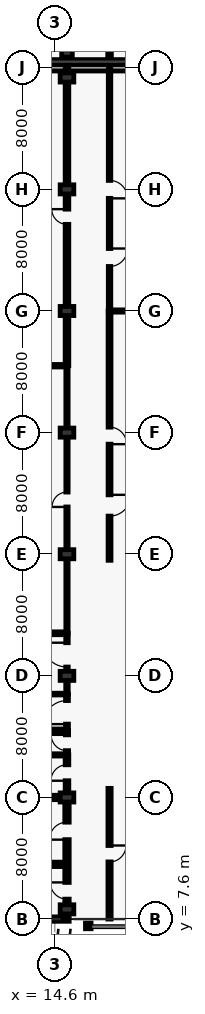
"""IFC4 building model, lengths in metres.
Left out: names, types, materials, properties, quantities, classifications, styles, units other than length and angle.
Written with IfcOpenShell. Run it as: python <this file> out.ifc"""

import sys

from ifc_helpers import new_model, si_unit, direction, frame, frame_2d, origin, origin_2d, place, context, subcontext, project, spatial, rectangle, i_section, extrude, element, fill, save


model = new_model("IFC4")
c1 = context("Model", 3, precision=1e-05, world=origin(), true_north=direction((0.0, 1.0)))
c2 = subcontext(c1, "Body", "Model", "MODEL_VIEW")
j1 = project(units=[si_unit("LENGTHUNIT", "METRE"), si_unit("PLANEANGLEUNIT", "RADIAN")], contexts=[c1])
p1 = place(None, origin())
s1 = spatial("IfcSite", under=j1, at=p1, CompositionType="ELEMENT")
p2 = place(p1, origin())
s2 = spatial("IfcBuilding", under=s1, at=p2, CompositionType="ELEMENT")
p3 = place(p2, frame((0.0, 0.0, 10.2)))
s3 = spatial("IfcBuildingStorey", under=s2, at=p3, CompositionType="ELEMENT", Elevation=10.2)
for number, where, z_axis, x_axis in (
    (1, (15.4, 8.24, 0.0), (0.0, 0.0, 1.0), (1.0, 0.0, 0.0)),
    (2, (15.4, 15.6, 0.0), (0.0, 0.0, 1.0), (1.0, 0.0, 0.0)),
    (3, (15.4, 23.6, 0.0), (0.0, 0.0, 1.0), (1.0, 0.0, 0.0)),
    (4, (15.4, 31.6, 0.0), (0.0, 0.0, 1.0), (1.0, 0.0, 0.0)),
    (5, (15.4, 39.6, 0.0), (0.0, 0.0, 1.0), (1.0, 0.0, 0.0)),
    (6, (15.4, 47.6, 0.0), (0.0, 0.0, 1.0), (1.0, 0.0, 0.0)),
    (7, (15.4, 55.6, 0.0), (0.0, 0.0, 1.0), (1.0, 0.0, 0.0)),
    (8, (15.4, 62.96, 0.0), (0.0, 0.0, 1.0), (1.0, 0.0, 0.0)),
):
    element("IfcColumn", number, at=place(p3, frame(where, z_axis=z_axis, x_axis=x_axis)), inside=s3, PredefinedType="COLUMN", context=c2, shape_type="SweptSolid", body=[
        extrude(rectangle(XDim=0.6, YDim=0.9, at=origin_2d()), origin(), (0.0, 0.0, 1.0), 5.4),
    ])
p4 = place(p3, frame((15.4, 64.64, 0.0), z_axis=(0.0, 0.0, 1.0), x_axis=(1.0, 0.0, 0.0)))
e9 = element("IfcColumn", 9, at=p4, inside=s3, PredefinedType="COLUMN", context=c2, shape_type="SweptSolid", body=[
    extrude(rectangle(XDim=0.7, YDim=0.7, at=origin_2d()), origin(), (0.0, 0.0, 1.0), 5.4),
])
p5 = place(p3, frame((16.8, 7.15, 0.0), z_axis=(0.0, 0.0, 1.0), x_axis=(1.0, 0.0, 0.0)))
e10 = element("IfcColumn", 10, at=p5, inside=s3, PredefinedType="COLUMN", context=c2, shape_type="SweptSolid", body=[
    extrude(i_section(OverallWidth=0.373, OverallDepth=0.368, WebThickness=0.014, FlangeThickness=0.024, at=origin_2d()), origin(), (0.0, 0.0, 1.0), 5.4),
])
p6 = place(p3, frame((8.0, 63.6, 0.0), z_axis=(0.0, 0.0, 1.0), x_axis=(1.0, 0.0, 0.0)))
e11 = element("IfcWall", 11, at=p6, inside=s3, PredefinedType="SOLIDWALL", context=c2, shape_type="SweptSolid", body=[
    extrude(rectangle(XDim=38.0, YDim=0.425, at=frame_2d((19.0, 0.0))), origin(), (0.0, 0.0, 1.0), 5.16),
])
p7 = place(p3, frame((40.2, 64.0, 0.0), z_axis=(0.0, 0.0, 1.0), x_axis=(-1.0, 0.0, 0.0)))
e12 = element("IfcWall", 12, at=p7, inside=s3, PredefinedType="SOLIDWALL", context=c2, shape_type="SweptSolid", body=[
    extrude(rectangle(XDim=32.2, YDim=0.275, at=frame_2d((16.1, 0.0))), origin(), (0.0, 0.0, 1.0), 3.7),
])
p8 = place(p3, frame((15.4, 64.145, 0.0), z_axis=(0.0, 0.0, 1.0), x_axis=(0.0, 1.0, 0.0)))
e13 = element("IfcWall", 13, at=p8, inside=s3, PredefinedType="SHEAR", context=c2, shape_type="SweptSolid", body=[
    extrude(rectangle(XDim=7.103, YDim=0.29, at=frame_2d((3.552, 0.0))), origin(), (0.0, 0.0, 1.0), 5.1),
])
p9 = place(p8, frame((1.105, 0.0, 0.0)))
e14 = element("IfcOpeningElement", 14, at=p9, cuts=e13, PredefinedType="OPENING", context=c2, shape_type="SweptSolid", body=[
    extrude(rectangle(XDim=1.1, YDim=2.15, at=frame_2d((0.55, 1.075))), frame((0.0, 0.155, 0.0), z_axis=(0.0, -1.0, 0.0), x_axis=(1.0, 0.0, 0.0)), (0.0, 0.0, 1.0), 0.31),
])
p10 = place(p8, frame((4.88, 0.0, 0.0)))
e15 = element("IfcOpeningElement", 15, at=p10, cuts=e13, PredefinedType="OPENING", context=c2, shape_type="SweptSolid", body=[
    extrude(rectangle(XDim=1.15, YDim=2.2, at=frame_2d((0.575, 1.1))), frame((0.0, 0.155, 0.0), z_axis=(0.0, -1.0, 0.0), x_axis=(1.0, 0.0, 0.0)), (0.0, 0.0, 1.0), 0.31),
])
p11 = place(p3, frame((7.855, 7.6, 0.0), z_axis=(0.0, 0.0, 1.0), x_axis=(1.0, 0.0, 0.0)))
e16 = element("IfcWall", 16, at=p11, inside=s3, PredefinedType="SHEAR", context=c2, shape_type="SweptSolid", body=[
    extrude(rectangle(XDim=7.69, YDim=0.29, at=frame_2d((3.845, 0.0))), origin(), (0.0, 0.0, 1.0), 5.16),
])
p12 = place(p3, frame((7.855, 15.6, 0.0), z_axis=(0.0, 0.0, 1.0), x_axis=(1.0, 0.0, 0.0)))
e17 = element("IfcWall", 17, at=p12, inside=s3, PredefinedType="SHEAR", context=c2, shape_type="SweptSolid", body=[
    extrude(rectangle(XDim=7.243, YDim=0.29, at=frame_2d((3.622, 0.0))), origin(), (0.0, 0.0, 1.0), 5.16),
])
p13 = place(p3, frame((15.4, 8.692, 0.0), z_axis=(0.0, 0.0, 1.0), x_axis=(0.0, 1.0, 0.0)))
e18 = element("IfcWall", 18, at=p13, inside=s3, PredefinedType="SHEAR", context=c2, shape_type="SweptSolid", body=[
    extrude(rectangle(XDim=6.456, YDim=0.29, at=frame_2d((3.228, 0.0))), origin(), (0.0, 0.0, 1.0), 5.16),
])
p14 = place(p13, frame((0.22, 0.0, 0.0)))
e19 = element("IfcOpeningElement", 19, at=p14, cuts=e18, PredefinedType="OPENING", context=c2, shape_type="SweptSolid", body=[
    extrude(rectangle(XDim=1.1, YDim=2.15, at=frame_2d((0.55, 1.075))), frame((0.0, 0.155, 0.0), z_axis=(0.0, -1.0, 0.0), x_axis=(1.0, 0.0, 0.0)), (0.0, 0.0, 1.0), 0.31),
])
p15 = place(p13, frame((4.133, 0.0, 0.0)))
e20 = element("IfcOpeningElement", 20, at=p15, cuts=e18, PredefinedType="OPENING", context=c2, shape_type="SweptSolid", body=[
    extrude(rectangle(XDim=1.15, YDim=2.2, at=frame_2d((0.575, 1.1))), frame((0.0, 0.155, 0.0), z_axis=(0.0, -1.0, 0.0), x_axis=(1.0, 0.0, 0.0)), (0.0, 0.0, 1.0), 0.31),
])
p16 = place(p3, frame((8.145, 11.2, 0.0), z_axis=(0.0, 0.0, 1.0), x_axis=(1.0, 0.0, 0.0)))
e21 = element("IfcWall", 21, at=p16, inside=s3, PredefinedType="SHEAR", context=c2, shape_type="SweptSolid", body=[
    extrude(rectangle(XDim=7.11, YDim=0.29, at=frame_2d((3.555, 0.0))), origin(), (0.0, 0.0, 1.0), 5.16),
])
p17 = place(p3, frame((15.4, 16.052, 0.0), z_axis=(0.0, 0.0, 1.0), x_axis=(0.0, 1.0, 0.0)))
e22 = element("IfcWall", 22, at=p17, inside=s3, PredefinedType="PARTITIONING", context=c2, shape_type="SweptSolid", body=[
    extrude(rectangle(XDim=2.348, YDim=0.24, at=frame_2d((1.174, 0.0))), origin(), (0.0, 0.0, 1.0), 4.31),
])
p18 = place(p17, frame((0.649, 0.0, 0.0)))
e23 = element("IfcOpeningElement", 23, at=p18, cuts=e22, PredefinedType="OPENING", context=c2, shape_type="SweptSolid", body=[
    extrude(rectangle(XDim=1.05, YDim=2.15, at=frame_2d((0.525, 1.075))), frame((0.0, 0.13, 0.0), z_axis=(0.0, -1.0, 0.0), x_axis=(1.0, 0.0, 0.0)), (0.0, 0.0, 1.0), 0.26),
])
p19 = place(p3, frame((15.4, 18.4, 0.0), z_axis=(0.0, 0.0, 1.0), x_axis=(0.0, 1.0, 0.0)))
e24 = element("IfcWall", 24, at=p19, inside=s3, PredefinedType="PARTITIONING", context=c2, shape_type="SweptSolid", body=[
    extrude(rectangle(XDim=1.6, YDim=0.21, at=frame_2d((0.8, 0.0))), origin(), (0.0, 0.0, 1.0), 4.31),
])
p20 = place(p19, frame((0.28, 0.0, 0.0)))
e25 = element("IfcOpeningElement", 25, at=p20, cuts=e24, PredefinedType="OPENING", context=c2, shape_type="SweptSolid", body=[
    extrude(rectangle(XDim=1.04, YDim=2.2, at=frame_2d((0.52, 1.1))), frame((0.0, 0.115, 0.0), z_axis=(0.0, -1.0, 0.0), x_axis=(1.0, 0.0, 0.0)), (0.0, 0.0, 1.0), 0.23),
])
p21 = place(p3, frame((15.4, 20.0, 0.0), z_axis=(0.0, 0.0, 1.0), x_axis=(0.0, 1.0, 0.0)))
e26 = element("IfcWall", 26, at=p21, inside=s3, PredefinedType="PARTITIONING", context=c2, shape_type="SweptSolid", body=[
    extrude(rectangle(XDim=2.4, YDim=0.19, at=frame_2d((1.2, 0.0))), origin(), (0.0, 0.0, 1.0), 4.31),
])
p22 = place(p21, frame((0.425, 0.0, 0.0)))
e27 = element("IfcOpeningElement", 27, at=p22, cuts=e26, PredefinedType="OPENING", context=c2, shape_type="SweptSolid", body=[
    extrude(rectangle(XDim=1.55, YDim=2.25, at=frame_2d((0.775, 1.125))), frame((0.0, 0.105, 0.0), z_axis=(0.0, -1.0, 0.0), x_axis=(1.0, 0.0, 0.0)), (0.0, 0.0, 1.0), 0.21),
])
p23 = place(p3, frame((15.4, 22.4, 0.0), z_axis=(0.0, 0.0, 1.0), x_axis=(0.0, 1.0, 0.0)))
e28 = element("IfcWall", 28, at=p23, inside=s3, PredefinedType="PARTITIONING", context=c2, shape_type="SweptSolid", body=[
    extrude(rectangle(XDim=4.0, YDim=0.165, at=frame_2d((2.0, 0.0))), origin(), (0.0, 0.0, 1.0), 4.31),
])
p24 = place(p23, frame((1.78, 0.0, 0.0)))
e29 = element("IfcOpeningElement", 29, at=p24, cuts=e28, PredefinedType="OPENING", context=c2, shape_type="SweptSolid", body=[
    extrude(rectangle(XDim=1.6, YDim=2.3, at=frame_2d((0.8, 1.15))), frame((0.0, 0.093, 0.0), z_axis=(0.0, -1.0, 0.0), x_axis=(1.0, 0.0, 0.0)), (0.0, 0.0, 1.0), 0.185),
])
p25 = place(p3, frame((15.4, 26.4, 0.0), z_axis=(0.0, 0.0, 1.0), x_axis=(0.0, 1.0, 0.0)))
e30 = element("IfcWall", 30, at=p25, inside=s3, PredefinedType="PARTITIONING", context=c2, shape_type="SweptSolid", body=[
    extrude(rectangle(XDim=17.6, YDim=0.15, at=frame_2d((8.8, 0.0))), origin(), (0.0, 0.0, 1.0), 4.31),
])
p26 = place(p25, frame((8.31, 0.0, 0.0)))
e31 = element("IfcOpeningElement", 31, at=p26, cuts=e30, PredefinedType="OPENING", context=c2, shape_type="SweptSolid", body=[
    extrude(rectangle(XDim=0.98, YDim=2.1, at=frame_2d((0.49, 1.05))), frame((0.0, 0.085, 0.0), z_axis=(0.0, -1.0, 0.0), x_axis=(1.0, 0.0, 0.0)), (0.0, 0.0, 1.0), 0.17),
])
p27 = place(p3, frame((15.4, 44.0, 0.0), z_axis=(0.0, 0.0, 1.0), x_axis=(0.0, 1.0, 0.0)))
e32 = element("IfcWall", 32, at=p27, inside=s3, PredefinedType="PARTITIONING", context=c2, shape_type="SweptSolid", body=[
    extrude(rectangle(XDim=19.6, YDim=0.24, at=frame_2d((9.8, 0.0))), origin(), (0.0, 0.0, 1.0), 4.31),
])
p28 = place(p27, frame((9.3, 0.0, 0.0)))
e33 = element("IfcOpeningElement", 33, at=p28, cuts=e32, PredefinedType="OPENING", context=c2, shape_type="SweptSolid", body=[
    extrude(rectangle(XDim=1.0, YDim=2.1, at=frame_2d((0.5, 1.05))), frame((0.0, 0.13, 0.0), z_axis=(0.0, -1.0, 0.0), x_axis=(1.0, 0.0, 0.0)), (0.0, 0.0, 1.0), 0.26),
])
p29 = place(p3, frame((18.2, 16.2, 0.0), z_axis=(0.0, 0.0, 1.0), x_axis=(0.0, -1.0, 0.0)))
e34 = element("IfcWall", 34, at=p29, inside=s3, PredefinedType="PARTITIONING", context=c2, shape_type="SweptSolid", body=[
    extrude(rectangle(XDim=8.6, YDim=0.21, at=frame_2d((4.3, 0.0))), origin(), (0.0, 0.0, 1.0), 5.16),
])
p30 = place(p29, frame((3.76, 0.0, 0.0)))
e35 = element("IfcOpeningElement", 35, at=p30, cuts=e34, PredefinedType="OPENING", context=c2, shape_type="SweptSolid", body=[
    extrude(rectangle(XDim=1.08, YDim=2.15, at=frame_2d((0.54, 1.075))), frame((0.0, 0.115, 0.0), z_axis=(0.0, -1.0, 0.0), x_axis=(1.0, 0.0, 0.0)), (0.0, 0.0, 1.0), 0.23),
])
p31 = place(p3, frame((18.2, 47.6, 0.0), z_axis=(0.0, 0.0, 1.0), x_axis=(0.0, -1.0, 0.0)))
e36 = element("IfcWall", 36, at=p31, inside=s3, PredefinedType="PARTITIONING", context=c2, shape_type="SweptSolid", body=[
    extrude(rectangle(XDim=16.4, YDim=0.19, at=frame_2d((8.2, 0.0))), origin(), (0.0, 0.0, 1.0), 5.16),
])
p32 = place(p31, frame((7.64, 0.0, 0.0)))
e37 = element("IfcOpeningElement", 37, at=p32, cuts=e36, PredefinedType="OPENING", context=c2, shape_type="SweptSolid", body=[
    extrude(rectangle(XDim=1.12, YDim=2.15, at=frame_2d((0.56, 1.075))), frame((0.0, 0.105, 0.0), z_axis=(0.0, -1.0, 0.0), x_axis=(1.0, 0.0, 0.0)), (0.0, 0.0, 1.0), 0.21),
])
p33 = place(p31, frame((12.092, 0.0, 0.0)))
e38 = element("IfcOpeningElement", 38, at=p33, cuts=e36, PredefinedType="OPENING", context=c2, shape_type="SweptSolid", body=[
    extrude(rectangle(XDim=1.4, YDim=2.25, at=frame_2d((0.7, 1.125))), frame((0.0, 0.105, 0.0), z_axis=(0.0, -1.0, 0.0), x_axis=(1.0, 0.0, 0.0)), (0.0, 0.0, 1.0), 0.21),
])
p34 = place(p3, frame((18.2, 63.6, 0.0), z_axis=(0.0, 0.0, 1.0), x_axis=(0.0, -1.0, 0.0)))
e39 = element("IfcWall", 39, at=p34, inside=s3, PredefinedType="PARTITIONING", context=c2, shape_type="SweptSolid", body=[
    extrude(rectangle(XDim=16.0, YDim=0.165, at=frame_2d((8.0, 0.0))), origin(), (0.0, 0.0, 1.0), 5.16),
])
p35 = place(p34, frame((7.41, 0.0, 0.0)))
e40 = element("IfcOpeningElement", 40, at=p35, cuts=e39, PredefinedType="OPENING", context=c2, shape_type="SweptSolid", body=[
    extrude(rectangle(XDim=1.18, YDim=2.15, at=frame_2d((0.59, 1.075))), frame((0.0, 0.093, 0.0), z_axis=(0.0, -1.0, 0.0), x_axis=(1.0, 0.0, 0.0)), (0.0, 0.0, 1.0), 0.185),
])
p36 = place(p34, frame((11.89, 0.0, 0.0)))
e41 = element("IfcOpeningElement", 41, at=p36, cuts=e39, PredefinedType="OPENING", context=c2, shape_type="SweptSolid", body=[
    extrude(rectangle(XDim=1.18, YDim=2.15, at=frame_2d((0.59, 1.075))), frame((0.0, 0.093, 0.0), z_axis=(0.0, -1.0, 0.0), x_axis=(1.0, 0.0, 0.0)), (0.0, 0.0, 1.0), 0.185),
])
p37 = place(p3, frame((12.0, 18.4, 0.0), z_axis=(0.0, 0.0, 1.0), x_axis=(1.0, 0.0, 0.0)))
e42 = element("IfcWall", 42, at=p37, inside=s3, PredefinedType="PARTITIONING", context=c2, shape_type="SweptSolid", body=[
    extrude(rectangle(XDim=3.4, YDim=0.15, at=frame_2d((1.7, 0.0))), origin(), (0.0, 0.0, 1.0), 5.16),
])
p38 = place(p3, frame((8.0, 20.0, 0.0), z_axis=(0.0, 0.0, 1.0), x_axis=(1.0, 0.0, 0.0)))
e43 = element("IfcWall", 43, at=p38, inside=s3, PredefinedType="PARTITIONING", context=c2, shape_type="SweptSolid", body=[
    extrude(rectangle(XDim=7.4, YDim=0.21, at=frame_2d((3.7, 0.0))), origin(), (0.0, 0.0, 1.0), 5.16),
])
p39 = place(p3, frame((8.0, 22.4, 0.0), z_axis=(0.0, 0.0, 1.0), x_axis=(1.0, 0.0, 0.0)))
e44 = element("IfcWall", 44, at=p39, inside=s3, PredefinedType="PARTITIONING", context=c2, shape_type="SweptSolid", body=[
    extrude(rectangle(XDim=7.4, YDim=0.115, at=frame_2d((3.7, 0.0))), origin(), (0.0, 0.0, 1.0), 5.16),
])
p40 = place(p3, frame((8.0, 26.4, 0.0), z_axis=(0.0, 0.0, 1.0), x_axis=(1.0, 0.0, 0.0)))
e45 = element("IfcWall", 45, at=p40, inside=s3, PredefinedType="PARTITIONING", context=c2, shape_type="SweptSolid", body=[
    extrude(rectangle(XDim=7.4, YDim=0.19, at=frame_2d((3.7, 0.0))), origin(), (0.0, 0.0, 1.0), 5.16),
])
p41 = place(p3, frame((8.0, 44.0, 0.0), z_axis=(0.0, 0.0, 1.0), x_axis=(1.0, 0.0, 0.0)))
e46 = element("IfcWall", 46, at=p41, inside=s3, PredefinedType="PARTITIONING", context=c2, shape_type="SweptSolid", body=[
    extrude(rectangle(XDim=7.4, YDim=0.165, at=frame_2d((3.7, 0.0))), origin(), (0.0, 0.0, 1.0), 5.16),
])
p42 = place(p3, frame((18.2, 47.6, 0.0), z_axis=(0.0, 0.0, 1.0), x_axis=(1.0, 0.0, 0.0)))
e47 = element("IfcWall", 47, at=p42, inside=s3, PredefinedType="PARTITIONING", context=c2, shape_type="SweptSolid", body=[
    extrude(rectangle(XDim=27.8, YDim=0.15, at=frame_2d((13.9, 0.0))), origin(), (0.0, 0.0, 1.0), 5.16),
])
p43 = place(p3, frame((18.2, 79.6, 0.0), z_axis=(0.0, 0.0, 1.0), x_axis=(0.0, -1.0, 0.0)))
e48 = element("IfcWall", 48, at=p43, inside=s3, PredefinedType="PARTITIONING", context=c2, shape_type="SweptSolid", body=[
    extrude(rectangle(XDim=15.6, YDim=0.24, at=frame_2d((7.8, 0.0))), origin(), (0.0, 0.0, 1.0), 5.1),
])
p44 = place(p43, frame((7.15, 0.0, 0.0)))
e49 = element("IfcOpeningElement", 49, at=p44, cuts=e48, PredefinedType="OPENING", context=c2, shape_type="SweptSolid", body=[
    extrude(rectangle(XDim=1.3, YDim=2.2, at=frame_2d((0.65, 1.1))), frame((0.0, 0.13, 0.0), z_axis=(0.0, -1.0, 0.0), x_axis=(1.0, 0.0, 0.0)), (0.0, 0.0, 1.0), 0.26),
])
p45 = place(p43, frame((11.468, 0.0, 0.0)))
e50 = element("IfcOpeningElement", 50, at=p45, cuts=e48, PredefinedType="OPENING", context=c2, shape_type="SweptSolid", body=[
    extrude(rectangle(XDim=1.4, YDim=2.25, at=frame_2d((0.7, 1.125))), frame((0.0, 0.13, 0.0), z_axis=(0.0, -1.0, 0.0), x_axis=(1.0, 0.0, 0.0)), (0.0, 0.0, 1.0), 0.26),
])
p46 = place(p14, origin())
e51 = element("IfcDoor", 51, at=p46, inside=s3, OperationType="SINGLE_SWING_RIGHT", PredefinedType="DOOR", context=c2, shape_type="SweptSolid", body=[
    extrude(rectangle(XDim=1.1, YDim=2.15, at=frame_2d((0.55, 1.075))), frame((0.0, 0.025, 0.0), z_axis=(0.0, -1.0, 0.0), x_axis=(1.0, 0.0, 0.0)), (0.0, 0.0, 1.0), 0.05),
])
fill(e19, e51)
p47 = place(p15, origin())
e52 = element("IfcDoor", 52, at=p47, inside=s3, OperationType="SINGLE_SWING_LEFT", PredefinedType="DOOR", context=c2, shape_type="SweptSolid", body=[
    extrude(rectangle(XDim=1.15, YDim=2.2, at=frame_2d((0.575, 1.1))), frame((0.0, 0.025, 0.0), z_axis=(0.0, -1.0, 0.0), x_axis=(1.0, 0.0, 0.0)), (0.0, 0.0, 1.0), 0.05),
])
fill(e20, e52)
p48 = place(p18, origin())
e53 = element("IfcDoor", 53, at=p48, inside=s3, OperationType="SINGLE_SWING_LEFT", PredefinedType="DOOR", context=c2, shape_type="SweptSolid", body=[
    extrude(rectangle(XDim=1.05, YDim=2.15, at=frame_2d((0.525, 1.075))), frame((0.0, 0.025, 0.0), z_axis=(0.0, -1.0, 0.0), x_axis=(1.0, 0.0, 0.0)), (0.0, 0.0, 1.0), 0.05),
])
fill(e23, e53)
p49 = place(p20, origin())
e54 = element("IfcDoor", 54, at=p49, inside=s3, OperationType="SINGLE_SWING_RIGHT", PredefinedType="DOOR", context=c2, shape_type="SweptSolid", body=[
    extrude(rectangle(XDim=1.04, YDim=2.2, at=frame_2d((0.52, 1.1))), frame((0.0, 0.025, 0.0), z_axis=(0.0, -1.0, 0.0), x_axis=(1.0, 0.0, 0.0)), (0.0, 0.0, 1.0), 0.05),
])
fill(e25, e54)
p50 = place(p22, origin())
e55 = element("IfcDoor", 55, at=p50, inside=s3, OperationType="SINGLE_SWING_LEFT", PredefinedType="DOOR", context=c2, shape_type="SweptSolid", body=[
    extrude(rectangle(XDim=1.55, YDim=2.25, at=frame_2d((0.775, 1.125))), frame((0.0, 0.025, 0.0), z_axis=(0.0, -1.0, 0.0), x_axis=(1.0, 0.0, 0.0)), (0.0, 0.0, 1.0), 0.05),
])
fill(e27, e55)
p51 = place(p24, origin())
e56 = element("IfcDoor", 56, at=p51, inside=s3, OperationType="SINGLE_SWING_RIGHT", PredefinedType="DOOR", context=c2, shape_type="SweptSolid", body=[
    extrude(rectangle(XDim=1.6, YDim=2.3, at=frame_2d((0.8, 1.15))), frame((0.0, 0.025, 0.0), z_axis=(0.0, -1.0, 0.0), x_axis=(1.0, 0.0, 0.0)), (0.0, 0.0, 1.0), 0.05),
])
fill(e29, e56)
p52 = place(p26, origin())
e57 = element("IfcDoor", 57, at=p52, inside=s3, OperationType="SINGLE_SWING_LEFT", PredefinedType="DOOR", context=c2, shape_type="SweptSolid", body=[
    extrude(rectangle(XDim=0.98, YDim=2.1, at=frame_2d((0.49, 1.05))), frame((0.0, 0.025, 0.0), z_axis=(0.0, -1.0, 0.0), x_axis=(1.0, 0.0, 0.0)), (0.0, 0.0, 1.0), 0.05),
])
fill(e31, e57)
p53 = place(p28, origin())
e58 = element("IfcDoor", 58, at=p53, inside=s3, OperationType="SINGLE_SWING_RIGHT", PredefinedType="DOOR", context=c2, shape_type="SweptSolid", body=[
    extrude(rectangle(XDim=1.0, YDim=2.1, at=frame_2d((0.5, 1.05))), frame((0.0, 0.025, 0.0), z_axis=(0.0, -1.0, 0.0), x_axis=(1.0, 0.0, 0.0)), (0.0, 0.0, 1.0), 0.05),
])
fill(e33, e58)
p54 = place(p30, origin())
e59 = element("IfcDoor", 59, at=p54, inside=s3, OperationType="SINGLE_SWING_LEFT", PredefinedType="DOOR", context=c2, shape_type="SweptSolid", body=[
    extrude(rectangle(XDim=1.08, YDim=2.15, at=frame_2d((0.54, 1.075))), frame((0.0, 0.025, 0.0), z_axis=(0.0, -1.0, 0.0), x_axis=(1.0, 0.0, 0.0)), (0.0, 0.0, 1.0), 0.05),
])
fill(e35, e59)
p55 = place(p32, origin())
e60 = element("IfcDoor", 60, at=p55, inside=s3, OperationType="SINGLE_SWING_RIGHT", PredefinedType="DOOR", context=c2, shape_type="SweptSolid", body=[
    extrude(rectangle(XDim=1.12, YDim=2.15, at=frame_2d((0.56, 1.075))), frame((0.0, 0.025, 0.0), z_axis=(0.0, -1.0, 0.0), x_axis=(1.0, 0.0, 0.0)), (0.0, 0.0, 1.0), 0.05),
])
fill(e37, e60)
p56 = place(p33, origin())
e61 = element("IfcDoor", 61, at=p56, inside=s3, OperationType="SINGLE_SWING_LEFT", PredefinedType="DOOR", context=c2, shape_type="SweptSolid", body=[
    extrude(rectangle(XDim=1.4, YDim=2.25, at=frame_2d((0.7, 1.125))), frame((0.0, 0.025, 0.0), z_axis=(0.0, -1.0, 0.0), x_axis=(1.0, 0.0, 0.0)), (0.0, 0.0, 1.0), 0.05),
])
fill(e38, e61)
p57 = place(p35, origin())
e62 = element("IfcDoor", 62, at=p57, inside=s3, OperationType="SINGLE_SWING_RIGHT", PredefinedType="DOOR", context=c2, shape_type="SweptSolid", body=[
    extrude(rectangle(XDim=1.18, YDim=2.15, at=frame_2d((0.59, 1.075))), frame((0.0, 0.025, 0.0), z_axis=(0.0, -1.0, 0.0), x_axis=(1.0, 0.0, 0.0)), (0.0, 0.0, 1.0), 0.05),
])
fill(e40, e62)
p58 = place(p36, origin())
e63 = element("IfcDoor", 63, at=p58, inside=s3, OperationType="SINGLE_SWING_LEFT", PredefinedType="DOOR", context=c2, shape_type="SweptSolid", body=[
    extrude(rectangle(XDim=1.18, YDim=2.15, at=frame_2d((0.59, 1.075))), frame((0.0, 0.025, 0.0), z_axis=(0.0, -1.0, 0.0), x_axis=(1.0, 0.0, 0.0)), (0.0, 0.0, 1.0), 0.05),
])
fill(e41, e63)
save(model, sys.argv[1])
